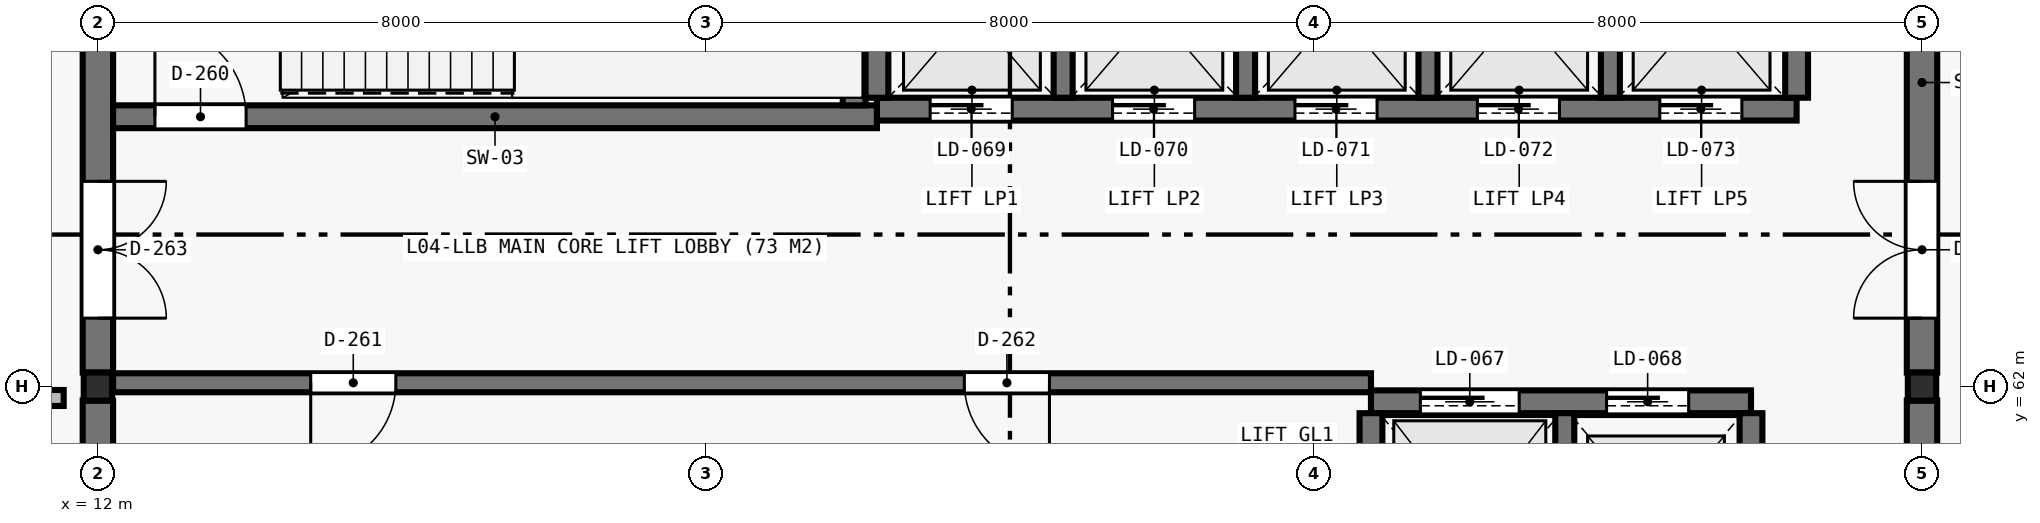
"""IFC4 building model, lengths in metres.
Left out: names, types, materials, properties, quantities, classifications, styles, units other than length and angle.
Written with IfcOpenShell. Run it as: python <this file> out.ifc"""

import sys

from ifc_helpers import new_model, si_unit, direction, frame, frame_2d, origin, origin_2d, place, context, subcontext, project, spatial, rectangle, i_section, extrude, element, fill, save


model = new_model("IFC4")
c1 = context("Model", 3, precision=1e-05, world=origin(), true_north=direction((0.0, 1.0)))
c2 = subcontext(c1, "Body", "Model", "MODEL_VIEW")
j1 = project(units=[si_unit("LENGTHUNIT", "METRE"), si_unit("PLANEANGLEUNIT", "RADIAN")], contexts=[c1])
p1 = place(None, origin())
s1 = spatial("IfcSite", under=j1, at=p1, CompositionType="ELEMENT")
p2 = place(p1, origin())
s2 = spatial("IfcBuilding", under=s1, at=p2, CompositionType="ELEMENT")
p3 = place(p2, frame((0.0, 0.0, 19.6)))
s3 = spatial("IfcBuildingStorey", under=s2, at=p3, CompositionType="ELEMENT", Elevation=19.6)
for number, where, z_axis, x_axis in (
    (1, (12.0, 62.0, 0.0), (0.0, 0.0, 1.0), (1.0, 0.0, 0.0)),
    (2, (36.0, 62.0, 0.0), (0.0, 0.0, 1.0), (1.0, 0.0, 0.0)),
):
    element("IfcColumn", number, at=place(p3, frame(where, z_axis=z_axis, x_axis=x_axis)), inside=s3, PredefinedType="COLUMN", context=c2, shape_type="SweptSolid", body=[
        extrude(i_section(OverallWidth=0.373, OverallDepth=0.368, WebThickness=0.015, FlangeThickness=0.024, at=origin_2d()), origin(), (0.0, 0.0, 1.0), 4.02),
    ])
p4 = place(p3, frame((12.0, 54.184, 0.0), z_axis=(0.0, 0.0, 1.0), x_axis=(0.0, 1.0, 0.0)))
e3 = element("IfcWall", 3, at=p4, inside=s3, PredefinedType="SHEAR", context=c2, shape_type="SweptSolid", body=[
    extrude(rectangle(XDim=7.632, YDim=0.4, at=frame_2d((3.816, 0.0))), origin(), (0.0, 0.0, 1.0), 4.02),
])
p5 = place(p3, frame((12.0, 62.184, 0.0), z_axis=(0.0, 0.0, 1.0), x_axis=(0.0, 1.0, 0.0)))
e4 = element("IfcWall", 4, at=p5, inside=s3, PredefinedType="SHEAR", context=c2, shape_type="SweptSolid", body=[
    extrude(rectangle(XDim=7.632, YDim=0.4, at=frame_2d((3.816, 0.0))), origin(), (0.0, 0.0, 1.0), 4.02),
])
p6 = place(p5, frame((0.716, 0.0, 0.0)))
e5 = element("IfcOpeningElement", 5, at=p6, cuts=e4, PredefinedType="OPENING", context=c2, shape_type="SweptSolid", body=[
    extrude(rectangle(XDim=1.8, YDim=2.2, at=frame_2d((0.9, 1.1))), frame((0.0, 0.21, 0.0), z_axis=(0.0, -1.0, 0.0), x_axis=(1.0, 0.0, 0.0)), (0.0, 0.0, 1.0), 0.42),
])
p7 = place(p3, frame((36.0, 54.184, 0.0), z_axis=(0.0, 0.0, 1.0), x_axis=(0.0, 1.0, 0.0)))
e6 = element("IfcWall", 6, at=p7, inside=s3, PredefinedType="SHEAR", context=c2, shape_type="SweptSolid", body=[
    extrude(rectangle(XDim=7.632, YDim=0.4, at=frame_2d((3.816, 0.0))), origin(), (0.0, 0.0, 1.0), 4.02),
])
p8 = place(p3, frame((36.0, 62.184, 0.0), z_axis=(0.0, 0.0, 1.0), x_axis=(0.0, 1.0, 0.0)))
e7 = element("IfcWall", 7, at=p8, inside=s3, PredefinedType="SHEAR", context=c2, shape_type="SweptSolid", body=[
    extrude(rectangle(XDim=7.632, YDim=0.4, at=frame_2d((3.816, 0.0))), origin(), (0.0, 0.0, 1.0), 4.02),
])
p9 = place(p8, frame((0.716, 0.0, 0.0)))
e8 = element("IfcOpeningElement", 8, at=p9, cuts=e7, PredefinedType="OPENING", context=c2, shape_type="SweptSolid", body=[
    extrude(rectangle(XDim=1.8, YDim=2.2, at=frame_2d((0.9, 1.1))), frame((0.0, 0.21, 0.0), z_axis=(0.0, -1.0, 0.0), x_axis=(1.0, 0.0, 0.0)), (0.0, 0.0, 1.0), 0.42),
])
p10 = place(p3, frame((28.75, 61.8, 0.0), z_axis=(0.0, 0.0, 1.0), x_axis=(1.0, 0.0, 0.0)))
e9 = element("IfcWall", 9, at=p10, inside=s3, PredefinedType="SHEAR", context=c2, shape_type="SweptSolid", body=[
    extrude(rectangle(XDim=5.0, YDim=0.3, at=frame_2d((2.5, 0.0))), origin(), (0.0, 0.0, 1.0), 4.02),
])
p11 = place(p10, frame((0.65, 0.0, 0.0)))
e10 = element("IfcOpeningElement", 10, at=p11, cuts=e9, PredefinedType="OPENING", context=c2, shape_type="SweptSolid", body=[
    extrude(rectangle(XDim=1.3, YDim=2.3, at=frame_2d((0.65, 1.15))), frame((0.0, 0.16, 0.0), z_axis=(0.0, -1.0, 0.0), x_axis=(1.0, 0.0, 0.0)), (0.0, 0.0, 1.0), 0.32),
])
p12 = place(p10, frame((3.1, 0.0, 0.0)))
e11 = element("IfcOpeningElement", 11, at=p12, cuts=e9, PredefinedType="OPENING", context=c2, shape_type="SweptSolid", body=[
    extrude(rectangle(XDim=1.08, YDim=2.2, at=frame_2d((0.54, 1.1))), frame((0.0, 0.16, 0.0), z_axis=(0.0, -1.0, 0.0), x_axis=(1.0, 0.0, 0.0)), (0.0, 0.0, 1.0), 0.32),
])
for number, where, z_axis, x_axis in (
    (12, (28.75, 58.8, 0.0), (0.0, 0.0, 1.0), (0.0, 1.0, 0.0)),
    (13, (33.75, 58.8, 0.0), (0.0, 0.0, 1.0), (0.0, 1.0, 0.0)),
):
    element("IfcWall", number, at=place(p3, frame(where, z_axis=z_axis, x_axis=x_axis)), inside=s3, PredefinedType="SHEAR", context=c2, shape_type="SweptSolid", body=[
        extrude(rectangle(XDim=2.85, YDim=0.3, at=frame_2d((1.425, 0.0))), origin(), (0.0, 0.0, 1.0), 4.02),
    ])
p13 = place(p3, frame((31.3, 58.8, 0.0), z_axis=(0.0, 0.0, 1.0), x_axis=(0.0, 1.0, 0.0)))
e14 = element("IfcWall", 14, at=p13, inside=s3, PredefinedType="SHEAR", context=c2, shape_type="SweptSolid", body=[
    extrude(rectangle(XDim=2.85, YDim=0.25, at=frame_2d((1.425, 0.0))), origin(), (0.0, 0.0, 1.0), 4.02),
])
p14 = place(p3, frame((12.2, 62.05, 0.0), z_axis=(0.0, 0.0, 1.0), x_axis=(1.0, 0.0, 0.0)))
e15 = element("IfcWall", 15, at=p14, inside=s3, PredefinedType="SHEAR", context=c2, shape_type="SweptSolid", body=[
    extrude(rectangle(XDim=16.55, YDim=0.25, at=frame_2d((8.275, 0.0))), origin(), (0.0, 0.0, 1.0), 4.02),
])
p15 = place(p14, frame((2.6, 0.0, 0.0)))
e16 = element("IfcOpeningElement", 16, at=p15, cuts=e15, PredefinedType="OPENING", context=c2, shape_type="SweptSolid", body=[
    extrude(rectangle(XDim=1.12, YDim=2.22, at=frame_2d((0.56, 1.11))), frame((0.0, 0.135, 0.0), z_axis=(0.0, -1.0, 0.0), x_axis=(1.0, 0.0, 0.0)), (0.0, 0.0, 1.0), 0.27),
])
p16 = place(p14, frame((11.2, 0.0, 0.0)))
e17 = element("IfcOpeningElement", 17, at=p16, cuts=e15, PredefinedType="OPENING", context=c2, shape_type="SweptSolid", body=[
    extrude(rectangle(XDim=1.12, YDim=2.22, at=frame_2d((0.56, 1.11))), frame((0.0, 0.135, 0.0), z_axis=(0.0, -1.0, 0.0), x_axis=(1.0, 0.0, 0.0)), (0.0, 0.0, 1.0), 0.27),
])
p17 = place(p3, frame((12.2, 65.55, 0.0), z_axis=(0.0, 0.0, 1.0), x_axis=(1.0, 0.0, 0.0)))
e18 = element("IfcWall", 18, at=p17, inside=s3, PredefinedType="SHEAR", context=c2, shape_type="SweptSolid", body=[
    extrude(rectangle(XDim=10.05, YDim=0.3, at=frame_2d((5.025, 0.0))), origin(), (0.0, 0.0, 1.0), 4.02),
])
p18 = place(p17, frame((0.55, 0.0, 0.0)))
e19 = element("IfcOpeningElement", 19, at=p18, cuts=e18, PredefinedType="OPENING", context=c2, shape_type="SweptSolid", body=[
    extrude(rectangle(XDim=1.2, YDim=2.2, at=frame_2d((0.6, 1.1))), frame((0.0, 0.16, 0.0), z_axis=(0.0, -1.0, 0.0), x_axis=(1.0, 0.0, 0.0)), (0.0, 0.0, 1.0), 0.32),
])
p19 = place(p3, frame((21.95, 65.7, 0.0), z_axis=(0.0, 0.0, 1.0), x_axis=(0.0, 1.0, 0.0)))
e20 = element("IfcWall", 20, at=p19, inside=s3, PredefinedType="SHEAR", context=c2, shape_type="SweptSolid", body=[
    extrude(rectangle(XDim=4.05, YDim=0.3, at=frame_2d((2.025, 0.0))), origin(), (0.0, 0.0, 1.0), 4.02),
])
p20 = place(p3, frame((22.25, 65.65, 0.0), z_axis=(0.0, 0.0, 1.0), x_axis=(1.0, 0.0, 0.0)))
e21 = element("IfcWall", 21, at=p20, inside=s3, PredefinedType="SHEAR", context=c2, shape_type="SweptSolid", body=[
    extrude(rectangle(XDim=12.1, YDim=0.3, at=frame_2d((6.05, 0.0))), origin(), (0.0, 0.0, 1.0), 4.02),
])
p21 = place(p20, frame((0.7, 0.0, 0.0)))
e22 = element("IfcOpeningElement", 22, at=p21, cuts=e21, PredefinedType="OPENING", context=c2, shape_type="SweptSolid", body=[
    extrude(rectangle(XDim=1.08, YDim=2.2, at=frame_2d((0.54, 1.1))), frame((0.0, 0.16, 0.0), z_axis=(0.0, -1.0, 0.0), x_axis=(1.0, 0.0, 0.0)), (0.0, 0.0, 1.0), 0.32),
])
p22 = place(p20, frame((3.1, 0.0, 0.0)))
e23 = element("IfcOpeningElement", 23, at=p22, cuts=e21, PredefinedType="OPENING", context=c2, shape_type="SweptSolid", body=[
    extrude(rectangle(XDim=1.08, YDim=2.2, at=frame_2d((0.54, 1.1))), frame((0.0, 0.16, 0.0), z_axis=(0.0, -1.0, 0.0), x_axis=(1.0, 0.0, 0.0)), (0.0, 0.0, 1.0), 0.32),
])
p23 = place(p20, frame((5.5, 0.0, 0.0)))
e24 = element("IfcOpeningElement", 24, at=p23, cuts=e21, PredefinedType="OPENING", context=c2, shape_type="SweptSolid", body=[
    extrude(rectangle(XDim=1.08, YDim=2.2, at=frame_2d((0.54, 1.1))), frame((0.0, 0.16, 0.0), z_axis=(0.0, -1.0, 0.0), x_axis=(1.0, 0.0, 0.0)), (0.0, 0.0, 1.0), 0.32),
])
p24 = place(p20, frame((7.9, 0.0, 0.0)))
e25 = element("IfcOpeningElement", 25, at=p24, cuts=e21, PredefinedType="OPENING", context=c2, shape_type="SweptSolid", body=[
    extrude(rectangle(XDim=1.08, YDim=2.2, at=frame_2d((0.54, 1.1))), frame((0.0, 0.16, 0.0), z_axis=(0.0, -1.0, 0.0), x_axis=(1.0, 0.0, 0.0)), (0.0, 0.0, 1.0), 0.32),
])
p25 = place(p20, frame((10.3, 0.0, 0.0)))
e26 = element("IfcOpeningElement", 26, at=p25, cuts=e21, PredefinedType="OPENING", context=c2, shape_type="SweptSolid", body=[
    extrude(rectangle(XDim=1.08, YDim=2.2, at=frame_2d((0.54, 1.1))), frame((0.0, 0.16, 0.0), z_axis=(0.0, -1.0, 0.0), x_axis=(1.0, 0.0, 0.0)), (0.0, 0.0, 1.0), 0.32),
])
for number, where, z_axis, x_axis in (
    (27, (22.25, 65.8, 0.0), (0.0, 0.0, 1.0), (0.0, 1.0, 0.0)),
    (28, (34.35, 65.8, 0.0), (0.0, 0.0, 1.0), (0.0, 1.0, 0.0)),
):
    element("IfcWall", number, at=place(p3, frame(where, z_axis=z_axis, x_axis=x_axis)), inside=s3, PredefinedType="SHEAR", context=c2, shape_type="SweptSolid", body=[
        extrude(rectangle(XDim=2.3, YDim=0.3, at=frame_2d((1.15, 0.0))), origin(), (0.0, 0.0, 1.0), 4.02),
    ])
for number, where, z_axis, x_axis in (
    (29, (24.7, 65.8, 0.0), (0.0, 0.0, 1.0), (0.0, 1.0, 0.0)),
    (30, (27.1, 65.8, 0.0), (0.0, 0.0, 1.0), (0.0, 1.0, 0.0)),
    (31, (29.5, 65.8, 0.0), (0.0, 0.0, 1.0), (0.0, 1.0, 0.0)),
    (32, (31.9, 65.8, 0.0), (0.0, 0.0, 1.0), (0.0, 1.0, 0.0)),
):
    element("IfcWall", number, at=place(p3, frame(where, z_axis=z_axis, x_axis=x_axis)), inside=s3, PredefinedType="SHEAR", context=c2, shape_type="SweptSolid", body=[
        extrude(rectangle(XDim=2.3, YDim=0.25, at=frame_2d((1.15, 0.0))), origin(), (0.0, 0.0, 1.0), 4.02),
    ])
p26 = place(p3, frame((6.35, 61.85, 0.0), z_axis=(0.0, 0.0, 1.0), x_axis=(1.0, 0.0, 0.0)))
e33 = element("IfcWall", 33, at=p26, inside=s3, PredefinedType="PLUMBINGWALL", context=c2, shape_type="SweptSolid", body=[
    extrude(rectangle(XDim=5.2, YDim=0.21, at=frame_2d((2.6, 0.0))), origin(), (0.0, 0.0, 1.0), 4.02),
])
p27 = place(p26, frame((0.35, 0.0, 0.0)))
e34 = element("IfcOpeningElement", 34, at=p27, cuts=e33, PredefinedType="OPENING", context=c2, shape_type="SweptSolid", body=[
    extrude(rectangle(XDim=0.95, YDim=2.1, at=frame_2d((0.475, 1.05))), frame((0.0, 0.115, 0.0), z_axis=(0.0, -1.0, 0.0), x_axis=(1.0, 0.0, 0.0)), (0.0, 0.0, 1.0), 0.23),
])
p28 = place(p26, frame((2.1, 0.0, 0.0)))
e35 = element("IfcOpeningElement", 35, at=p28, cuts=e33, PredefinedType="OPENING", context=c2, shape_type="SweptSolid", body=[
    extrude(rectangle(XDim=0.9, YDim=2.1, at=frame_2d((0.45, 1.05))), frame((0.0, 0.115, 0.0), z_axis=(0.0, -1.0, 0.0), x_axis=(1.0, 0.0, 0.0)), (0.0, 0.0, 1.0), 0.23),
])
p29 = place(p26, frame((3.8, 0.0, 0.0)))
e36 = element("IfcOpeningElement", 36, at=p29, cuts=e33, PredefinedType="OPENING", context=c2, shape_type="SweptSolid", body=[
    extrude(rectangle(XDim=0.9, YDim=2.1, at=frame_2d((0.45, 1.05))), frame((0.0, 0.115, 0.0), z_axis=(0.0, -1.0, 0.0), x_axis=(1.0, 0.0, 0.0)), (0.0, 0.0, 1.0), 0.23),
])
p30 = place(p18, origin())
e37 = element("IfcDoor", 37, at=p30, inside=s3, OperationType="SINGLE_SWING_LEFT", PredefinedType="DOOR", context=c2, shape_type="SweptSolid", body=[
    extrude(rectangle(XDim=1.2, YDim=2.2, at=frame_2d((0.6, 1.1))), frame((0.0, 0.025, 0.0), z_axis=(0.0, -1.0, 0.0), x_axis=(1.0, 0.0, 0.0)), (0.0, 0.0, 1.0), 0.05),
])
fill(e19, e37)
p31 = place(p11, origin())
e38 = element("IfcDoor", 38, at=p31, inside=s3, OperationType="SLIDING_TO_LEFT", PredefinedType="DOOR", context=c2, shape_type="SweptSolid", body=[
    extrude(rectangle(XDim=1.3, YDim=2.3, at=frame_2d((0.65, 1.15))), frame((0.0, 0.025, 0.0), z_axis=(0.0, -1.0, 0.0), x_axis=(1.0, 0.0, 0.0)), (0.0, 0.0, 1.0), 0.05),
])
fill(e10, e38)
p32 = place(p12, origin())
e39 = element("IfcDoor", 39, at=p32, inside=s3, OperationType="SLIDING_TO_LEFT", PredefinedType="DOOR", context=c2, shape_type="SweptSolid", body=[
    extrude(rectangle(XDim=1.08, YDim=2.2, at=frame_2d((0.54, 1.1))), frame((0.0, 0.025, 0.0), z_axis=(0.0, -1.0, 0.0), x_axis=(1.0, 0.0, 0.0)), (0.0, 0.0, 1.0), 0.05),
])
fill(e11, e39)
p33 = place(p21, origin())
e40 = element("IfcDoor", 40, at=p33, inside=s3, OperationType="SLIDING_TO_LEFT", PredefinedType="DOOR", context=c2, shape_type="SweptSolid", body=[
    extrude(rectangle(XDim=1.08, YDim=2.2, at=frame_2d((0.54, 1.1))), frame((0.0, 0.025, 0.0), z_axis=(0.0, -1.0, 0.0), x_axis=(1.0, 0.0, 0.0)), (0.0, 0.0, 1.0), 0.05),
])
fill(e22, e40)
p34 = place(p22, origin())
e41 = element("IfcDoor", 41, at=p34, inside=s3, OperationType="SLIDING_TO_LEFT", PredefinedType="DOOR", context=c2, shape_type="SweptSolid", body=[
    extrude(rectangle(XDim=1.08, YDim=2.2, at=frame_2d((0.54, 1.1))), frame((0.0, 0.025, 0.0), z_axis=(0.0, -1.0, 0.0), x_axis=(1.0, 0.0, 0.0)), (0.0, 0.0, 1.0), 0.05),
])
fill(e23, e41)
p35 = place(p23, origin())
e42 = element("IfcDoor", 42, at=p35, inside=s3, OperationType="SLIDING_TO_LEFT", PredefinedType="DOOR", context=c2, shape_type="SweptSolid", body=[
    extrude(rectangle(XDim=1.08, YDim=2.2, at=frame_2d((0.54, 1.1))), frame((0.0, 0.025, 0.0), z_axis=(0.0, -1.0, 0.0), x_axis=(1.0, 0.0, 0.0)), (0.0, 0.0, 1.0), 0.05),
])
fill(e24, e42)
p36 = place(p24, origin())
e43 = element("IfcDoor", 43, at=p36, inside=s3, OperationType="SLIDING_TO_LEFT", PredefinedType="DOOR", context=c2, shape_type="SweptSolid", body=[
    extrude(rectangle(XDim=1.08, YDim=2.2, at=frame_2d((0.54, 1.1))), frame((0.0, 0.025, 0.0), z_axis=(0.0, -1.0, 0.0), x_axis=(1.0, 0.0, 0.0)), (0.0, 0.0, 1.0), 0.05),
])
fill(e25, e43)
p37 = place(p25, origin())
e44 = element("IfcDoor", 44, at=p37, inside=s3, OperationType="SLIDING_TO_LEFT", PredefinedType="DOOR", context=c2, shape_type="SweptSolid", body=[
    extrude(rectangle(XDim=1.08, YDim=2.2, at=frame_2d((0.54, 1.1))), frame((0.0, 0.025, 0.0), z_axis=(0.0, -1.0, 0.0), x_axis=(1.0, 0.0, 0.0)), (0.0, 0.0, 1.0), 0.05),
])
fill(e26, e44)
p38 = place(p15, frame((1.12, 0.0, 0.0), z_axis=(0.0, 0.0, 1.0), x_axis=(-1.0, 0.0, 0.0)))
e45 = element("IfcDoor", 45, at=p38, inside=s3, OperationType="SINGLE_SWING_RIGHT", PredefinedType="DOOR", context=c2, shape_type="SweptSolid", body=[
    extrude(rectangle(XDim=1.12, YDim=2.22, at=frame_2d((0.56, 1.11))), frame((0.0, 0.025, 0.0), z_axis=(0.0, -1.0, 0.0), x_axis=(1.0, 0.0, 0.0)), (0.0, 0.0, 1.0), 0.05),
])
fill(e16, e45)
p39 = place(p16, frame((1.12, 0.0, 0.0), z_axis=(0.0, 0.0, 1.0), x_axis=(-1.0, 0.0, 0.0)))
e46 = element("IfcDoor", 46, at=p39, inside=s3, OperationType="SINGLE_SWING_LEFT", PredefinedType="DOOR", context=c2, shape_type="SweptSolid", body=[
    extrude(rectangle(XDim=1.12, YDim=2.22, at=frame_2d((0.56, 1.11))), frame((0.0, 0.025, 0.0), z_axis=(0.0, -1.0, 0.0), x_axis=(1.0, 0.0, 0.0)), (0.0, 0.0, 1.0), 0.05),
])
fill(e17, e46)
p40 = place(p6, frame((1.8, 0.0, 0.0), z_axis=(0.0, 0.0, 1.0), x_axis=(-1.0, 0.0, 0.0)))
e47 = element("IfcDoor", 47, at=p40, inside=s3, OperationType="DOUBLE_DOOR_SINGLE_SWING", PredefinedType="DOOR", context=c2, shape_type="SweptSolid", body=[
    extrude(rectangle(XDim=1.8, YDim=2.2, at=frame_2d((0.9, 1.1))), frame((0.0, 0.025, 0.0), z_axis=(0.0, -1.0, 0.0), x_axis=(1.0, 0.0, 0.0)), (0.0, 0.0, 1.0), 0.05),
])
fill(e5, e47)
p41 = place(p9, origin())
e48 = element("IfcDoor", 48, at=p41, inside=s3, OperationType="DOUBLE_DOOR_SINGLE_SWING", PredefinedType="DOOR", context=c2, shape_type="SweptSolid", body=[
    extrude(rectangle(XDim=1.8, YDim=2.2, at=frame_2d((0.9, 1.1))), frame((0.0, 0.025, 0.0), z_axis=(0.0, -1.0, 0.0), x_axis=(1.0, 0.0, 0.0)), (0.0, 0.0, 1.0), 0.05),
])
fill(e8, e48)
save(model, sys.argv[1])
